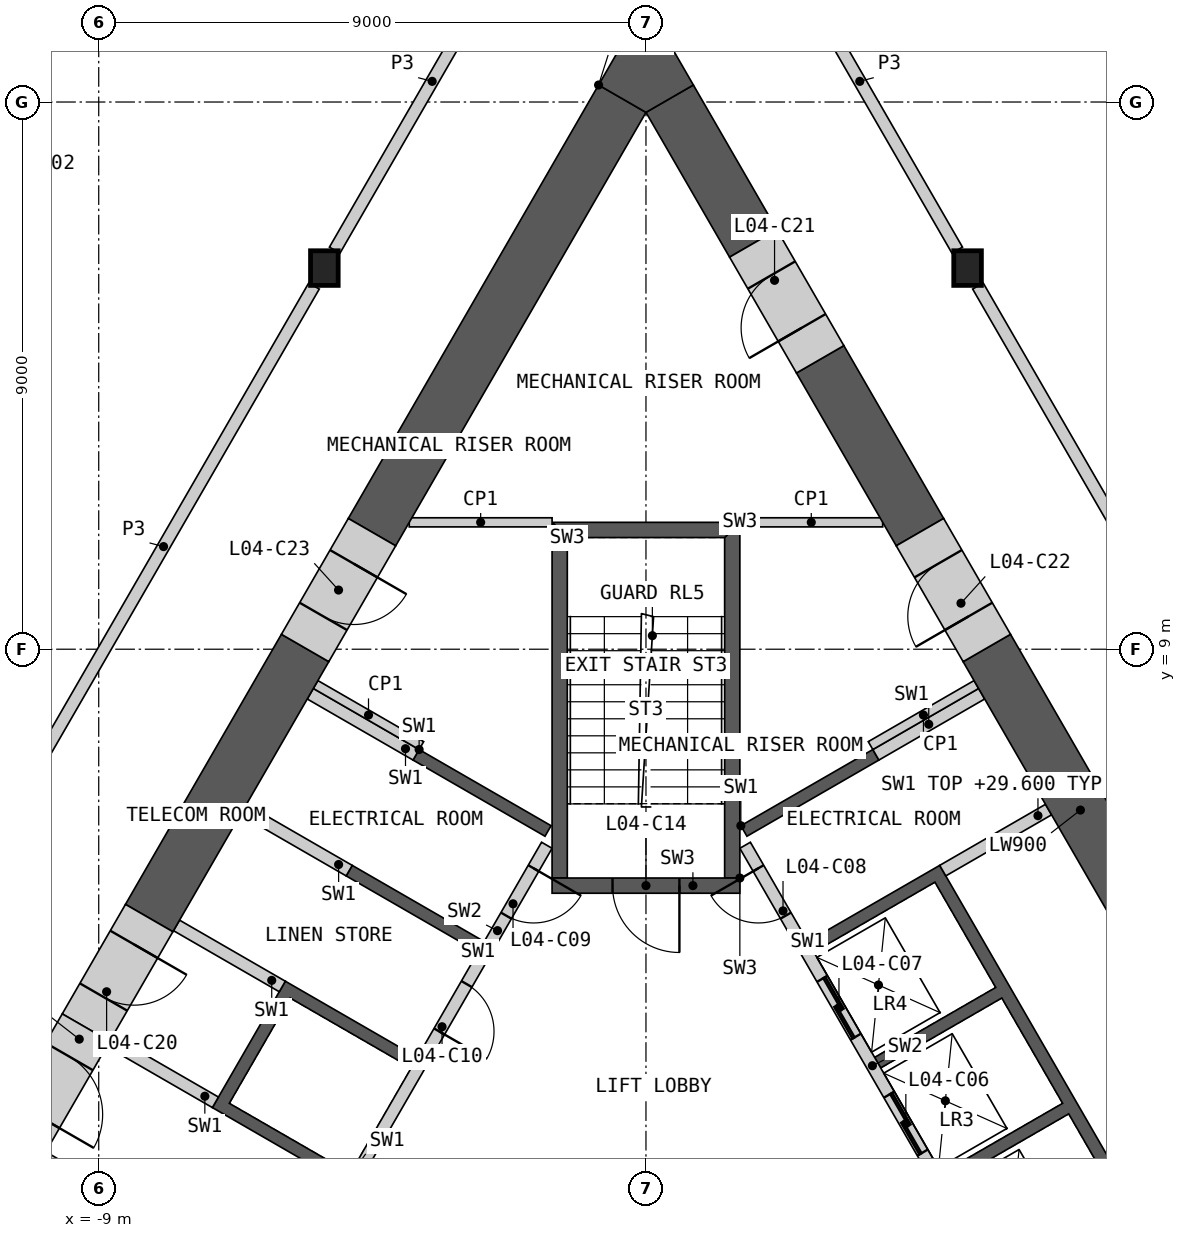
"""IFC4 building model, lengths in metres.
Left out: names, types, materials, properties, quantities, classifications, styles, units other than length and angle.
Written with IfcOpenShell. Run it as: python <this file> out.ifc"""

import sys

from ifc_helpers import new_model, si_unit, direction, frame, frame_2d, origin, origin_2d, place, context, subcontext, project, spatial, polyline, rectangle, i_section, outline, extrude, element, fill, save


model = new_model("IFC4")
c1 = context("Model", 3, precision=1e-05, world=origin(), true_north=direction((0.0, 1.0)))
c2 = subcontext(c1, "Body", "Model", "MODEL_VIEW")
j1 = project(units=[si_unit("LENGTHUNIT", "METRE"), si_unit("PLANEANGLEUNIT", "RADIAN")], contexts=[c1])
p1 = place(None, origin())
s1 = spatial("IfcSite", under=j1, at=p1, CompositionType="ELEMENT")
p2 = place(p1, origin())
s2 = spatial("IfcBuilding", under=s1, at=p2, CompositionType="ELEMENT")
p3 = place(p2, frame((0.0, 0.0, 25.5)))
s3 = spatial("IfcBuildingStorey", under=s2, at=p3, CompositionType="ELEMENT", Elevation=25.5)
for number, where, z_axis, x_axis in (
    (1, (-5.289, 15.269, 0.0), (0.0, 0.0, 1.0), (1.0, 0.0, 0.0)),
    (2, (5.289, 15.269, 0.0), (0.0, 0.0, 1.0), (1.0, 0.0, 0.0)),
):
    element("IfcColumn", number, at=place(p3, frame(where, z_axis=z_axis, x_axis=x_axis)), inside=s3, PredefinedType="COLUMN", context=c2, shape_type="SweptSolid", body=[
        extrude(i_section(OverallWidth=0.454, OverallDepth=0.57, WebThickness=0.078, FlangeThickness=0.125, at=origin_2d()), origin(), (0.0, 0.0, 1.0), 4.5),
    ])
p4 = place(p3, origin())
e3 = element("IfcWall", 3, at=p4, inside=s3, PredefinedType="SHEAR", context=c2, shape_type="SweptSolid", body=[
    extrude(outline(polyline([(1.561, 6.097), (3.731, 7.35), (3.831, 7.177), (1.66, 5.924), (1.561, 6.097)])), origin(), (0.0, 0.0, 1.0), 4.1),
])
p5 = place(p3, origin())
e4 = element("IfcWall", 4, at=p5, inside=s3, PredefinedType="SHEAR", context=c2, shape_type="SweptSolid", body=[
    extrude(outline(polyline([(2.66, 4.192), (4.831, 5.445), (8.231, -0.444), (6.061, -1.697), (5.96, -1.524), (7.952, -0.374), (6.952, 1.358), (4.96, 0.208), (4.861, 0.381), (6.852, 1.531), (5.852, 3.263), (3.861, 2.113), (3.76, 2.287), (5.752, 3.437), (4.752, 5.169), (2.76, 4.019), (2.66, 4.192)])), origin(), (0.0, 0.0, 1.0), 4.1),
])
p6 = place(p3, frame((5.817, -1.476, 0.0), z_axis=(0.0, 0.0, 1.0), x_axis=(-0.500002616675, 0.866023893041, 0.0)))
e5 = element("IfcWall", 5, at=p6, inside=s3, PredefinedType="SOLIDWALL", context=c2, shape_type="SweptSolid", body=[
    extrude(rectangle(XDim=8.373, YDim=0.2, at=frame_2d((4.187, 0.0))), origin(), (0.0, 0.0, 1.0), 4.1),
])
p7 = place(p6, frame((0.337, 0.0, 0.0)))
e6 = element("IfcOpeningElement", 6, at=p7, cuts=e5, PredefinedType="OPENING", context=c2, shape_type="SweptSolid", body=[
    extrude(rectangle(XDim=1.1, YDim=2.1, at=frame_2d((0.55, 1.05))), frame((0.0, 0.11, 0.0), z_axis=(0.0, -1.0, 0.0), x_axis=(1.0, 0.0, 0.0)), (0.0, 0.0, 1.0), 0.22),
])
p8 = place(p6, frame((2.537, 0.0, 0.0)))
e7 = element("IfcOpeningElement", 7, at=p8, cuts=e5, PredefinedType="OPENING", context=c2, shape_type="SweptSolid", body=[
    extrude(rectangle(XDim=1.1, YDim=2.1, at=frame_2d((0.55, 1.05))), frame((0.0, 0.11, 0.0), z_axis=(0.0, -1.0, 0.0), x_axis=(1.0, 0.0, 0.0)), (0.0, 0.0, 1.0), 0.22),
])
p9 = place(p6, frame((4.737, 0.0, 0.0)))
e8 = element("IfcOpeningElement", 8, at=p9, cuts=e5, PredefinedType="OPENING", context=c2, shape_type="SweptSolid", body=[
    extrude(rectangle(XDim=1.1, YDim=2.1, at=frame_2d((0.55, 1.05))), frame((0.0, 0.11, 0.0), z_axis=(0.0, -1.0, 0.0), x_axis=(1.0, 0.0, 0.0)), (0.0, 0.0, 1.0), 0.22),
])
p10 = place(p6, frame((7.037, 0.0, 0.0)))
e9 = element("IfcOpeningElement", 9, at=p10, cuts=e5, PredefinedType="OPENING", context=c2, shape_type="SweptSolid", body=[
    extrude(rectangle(XDim=0.9, YDim=2.1, at=frame_2d((0.45, 1.05))), frame((0.0, 0.11, 0.0), z_axis=(0.0, -1.0, 0.0), x_axis=(1.0, 0.0, 0.0)), (0.0, 0.0, 1.0), 0.22),
])
p11 = place(p3, frame((4.881, 5.358, 0.0), z_axis=(0.0, 0.0, 1.0), x_axis=(0.866035824272, 0.499981950752, 0.0)))
e10 = element("IfcWall", 10, at=p11, inside=s3, PredefinedType="SHEAR", context=c2, shape_type="SweptSolid", body=[
    extrude(rectangle(XDim=2.009, YDim=0.2, at=frame_2d((1.004, 0.0))), origin(), (0.0, 0.0, 1.0), 4.1),
])
p12 = place(p3, frame((3.781, 7.263, 0.0), z_axis=(0.0, 0.0, 1.0), x_axis=(0.865983199114, 0.50007309351, 0.0)))
e11 = element("IfcWall", 11, at=p12, inside=s3, PredefinedType="SHEAR", context=c2, shape_type="SweptSolid", body=[
    extrude(rectangle(XDim=2.009, YDim=0.2, at=frame_2d((1.004, 0.0))), origin(), (0.0, 0.0, 1.0), 4.1),
])
p13 = place(p3, origin())
e12 = element("IfcWall", 12, at=p13, inside=s3, PredefinedType="SHEAR", context=c2, shape_type="SweptSolid", body=[
    extrude(outline(polyline([(-4.96, 0.208), (-7.131, 1.461), (-5.931, 3.54), (-3.76, 2.287), (-3.861, 2.113), (-5.852, 3.263), (-6.852, 1.531), (-4.861, 0.381), (-4.96, 0.208)])), origin(), (0.0, 0.0, 1.0), 4.1),
])
p14 = place(p3, origin())
e13 = element("IfcWall", 13, at=p14, inside=s3, PredefinedType="SHEAR", context=c2, shape_type="SweptSolid", body=[
    extrude(outline(polyline([(-2.76, 4.019), (-4.931, 5.272), (-4.831, 5.445), (-2.66, 4.192), (-2.76, 4.019)])), origin(), (0.0, 0.0, 1.0), 4.1),
])
p15 = place(p3, origin())
e14 = element("IfcWall", 14, at=p15, inside=s3, PredefinedType="SHEAR", context=c2, shape_type="SweptSolid", body=[
    extrude(outline(polyline([(-3.731, 7.35), (-1.561, 6.097), (-1.66, 5.924), (-3.831, 7.177), (-3.731, 7.35)])), origin(), (0.0, 0.0, 1.0), 4.1),
])
p16 = place(p3, frame((-1.631, 5.776, 0.0), z_axis=(0.0, 0.0, 1.0), x_axis=(-0.499992876559, -0.866029516466, 0.0)))
e15 = element("IfcWall", 15, at=p16, inside=s3, PredefinedType="SOLIDWALL", context=c2, shape_type="SweptSolid", body=[
    extrude(rectangle(XDim=6.486, YDim=0.2, at=frame_2d((3.243, 0.0))), origin(), (0.0, 0.0, 1.0), 4.1),
])
p17 = place(p16, frame((0.437, 0.0, 0.0)))
e16 = element("IfcOpeningElement", 16, at=p17, cuts=e15, PredefinedType="OPENING", context=c2, shape_type="SweptSolid", body=[
    extrude(rectangle(XDim=0.9, YDim=2.1, at=frame_2d((0.45, 1.05))), frame((0.0, 0.11, 0.0), z_axis=(0.0, -1.0, 0.0), x_axis=(1.0, 0.0, 0.0)), (0.0, 0.0, 1.0), 0.22),
])
p18 = place(p16, frame((2.637, 0.0, 0.0)))
e17 = element("IfcOpeningElement", 17, at=p18, cuts=e15, PredefinedType="OPENING", context=c2, shape_type="SweptSolid", body=[
    extrude(rectangle(XDim=0.9, YDim=2.1, at=frame_2d((0.45, 1.05))), frame((0.0, 0.11, 0.0), z_axis=(0.0, -1.0, 0.0), x_axis=(1.0, 0.0, 0.0)), (0.0, 0.0, 1.0), 0.22),
])
p19 = place(p3, frame((-3.781, 7.263, 0.0), z_axis=(0.0, 0.0, 1.0), x_axis=(-0.865983199114, 0.50007309351, 0.0)))
e18 = element("IfcWall", 18, at=p19, inside=s3, PredefinedType="SHEAR", context=c2, shape_type="SweptSolid", body=[
    extrude(rectangle(XDim=2.009, YDim=0.2, at=frame_2d((1.004, 0.0))), origin(), (0.0, 0.0, 1.0), 4.1),
])
p20 = place(p3, frame((-4.881, 5.358, 0.0), z_axis=(0.0, 0.0, 1.0), x_axis=(-0.866035824272, 0.499981950752, 0.0)))
e19 = element("IfcWall", 19, at=p20, inside=s3, PredefinedType="SHEAR", context=c2, shape_type="SweptSolid", body=[
    extrude(rectangle(XDim=2.009, YDim=0.2, at=frame_2d((1.004, 0.0))), origin(), (0.0, 0.0, 1.0), 4.1),
])
p21 = place(p3, frame((-5.981, 3.453, 0.0), z_axis=(0.0, 0.0, 1.0), x_axis=(-0.866013584312, 0.500020471368, 0.0)))
e20 = element("IfcWall", 20, at=p21, inside=s3, PredefinedType="SHEAR", context=c2, shape_type="SweptSolid", body=[
    extrude(rectangle(XDim=2.009, YDim=0.2, at=frame_2d((1.005, 0.0))), origin(), (0.0, 0.0, 1.0), 4.1),
])
p22 = place(p3, frame((-7.081, 1.548, 0.0), z_axis=(0.0, 0.0, 1.0), x_axis=(-0.865983199114, 0.50007309351, 0.0)))
e21 = element("IfcWall", 21, at=p22, inside=s3, PredefinedType="SHEAR", context=c2, shape_type="SweptSolid", body=[
    extrude(rectangle(XDim=2.009, YDim=0.2, at=frame_2d((1.004, 0.0))), origin(), (0.0, 0.0, 1.0), 4.1),
])
p23 = place(p3, frame((-8.181, -0.357, 0.0), z_axis=(0.0, 0.0, 1.0), x_axis=(-0.866035824272, 0.499981950752, 0.0)))
e22 = element("IfcWall", 22, at=p23, inside=s3, PredefinedType="SHEAR", context=c2, shape_type="SweptSolid", body=[
    extrude(rectangle(XDim=2.009, YDim=0.2, at=frame_2d((1.004, 0.0))), origin(), (0.0, 0.0, 1.0), 4.1),
])
p24 = place(p3, origin())
e23 = element("IfcWall", 23, at=p24, inside=s3, PredefinedType="SHEAR", context=c2, shape_type="SweptSolid", body=[
    extrude(outline(polyline([(1.544, 5.237), (1.544, 11.087), (1.294, 10.837), (1.294, 5.237), (1.544, 5.237)])), origin(), (0.0, 0.0, 1.0), 4.1),
])
p25 = place(p3, origin())
e24 = element("IfcWall", 24, at=p25, inside=s3, PredefinedType="SHEAR", context=c2, shape_type="SweptSolid", body=[
    extrude(outline(polyline([(1.544, 11.087), (-1.544, 11.087), (-1.294, 10.837), (1.294, 10.837), (1.544, 11.087)])), origin(), (0.0, 0.0, 1.0), 4.1),
])
p26 = place(p3, origin())
e25 = element("IfcWall", 25, at=p26, inside=s3, PredefinedType="SHEAR", context=c2, shape_type="SweptSolid", body=[
    extrude(outline(polyline([(-1.294, 10.837), (-1.544, 11.087), (-1.544, 5.237), (-1.294, 5.237), (-1.294, 10.837)])), origin(), (0.0, 0.0, 1.0), 4.1),
])
p27 = place(p3, frame((1.544, 5.112, 0.0), z_axis=(0.0, 0.0, 1.0), x_axis=(-1.0, 0.0, 0.0)))
e26 = element("IfcWall", 26, at=p27, inside=s3, PredefinedType="SHEAR", context=c2, shape_type="SweptSolid", body=[
    extrude(rectangle(XDim=3.088, YDim=0.25, at=frame_2d((1.544, 0.0))), origin(), (0.0, 0.0, 1.0), 4.1),
])
p28 = place(p27, frame((0.994, 0.0, 0.0)))
e27 = element("IfcOpeningElement", 27, at=p28, cuts=e26, PredefinedType="OPENING", context=c2, shape_type="SweptSolid", body=[
    extrude(rectangle(XDim=1.1, YDim=2.1, at=frame_2d((0.55, 1.05))), frame((0.0, 0.135, 0.0), z_axis=(0.0, -1.0, 0.0), x_axis=(1.0, 0.0, 0.0)), (0.0, 0.0, 1.0), 0.27),
])
for number, where, z_axis, x_axis in (
    (28, (3.693, 7.415, 0.0), (0.0, 0.0, 1.0), (0.866, 0.5, 0.0)),
    (29, (-3.693, 7.415, 0.0), (0.0, 0.0, 1.0), (-0.866, 0.5, 0.0)),
):
    element("IfcWall", number, at=place(p3, frame(where, z_axis=z_axis, x_axis=x_axis)), inside=s3, PredefinedType="PARTITIONING", context=c2, shape_type="SweptSolid", body=[
        extrude(rectangle(XDim=2.009, YDim=0.15, at=frame_2d((1.004, 0.0))), origin(), (0.0, 0.0, 1.0), 4.1),
    ])
for number, where, z_axis, x_axis in (
    (30, (1.544, 11.087, 0.0), (0.0, 0.0, 1.0), (1.0, 0.0, 0.0)),
    (31, (-1.544, 11.087, 0.0), (0.0, 0.0, 1.0), (-1.0, 0.0, 0.0)),
):
    element("IfcWall", number, at=place(p3, frame(where, z_axis=z_axis, x_axis=x_axis)), inside=s3, PredefinedType="PARTITIONING", context=c2, shape_type="SweptSolid", body=[
        extrude(rectangle(XDim=2.349, YDim=0.15, at=frame_2d((1.175, 0.0))), origin(), (0.0, 0.0, 1.0), 4.1),
    ])
p29 = place(p3, frame((8.684, 3.688, 0.0), z_axis=(0.0, 0.0, 1.0), x_axis=(-0.499990189338, 0.866031067899, 0.0)))
e32 = element("IfcWall", 32, at=p29, inside=s3, PredefinedType="SHEAR", context=c2, shape_type="SweptSolid", body=[
    extrude(rectangle(XDim=6.157, YDim=0.9, at=frame_2d((3.078, 0.0))), origin(), (0.0, 0.0, 1.0), 4.1),
])
p30 = place(p3, frame((4.506, 10.926, 0.0), z_axis=(0.0, 0.0, 1.0), x_axis=(-0.499995024727, 0.866028276241, 0.0)))
e33 = element("IfcWall", 33, at=p30, inside=s3, PredefinedType="SHEAR", context=c2, shape_type="SweptSolid", body=[
    extrude(rectangle(XDim=3.282, YDim=0.9, at=frame_2d((1.641, 0.0))), origin(), (0.0, 0.0, 1.0), 4.1),
])
p31 = place(p3, frame((1.765, 15.674, 0.0), z_axis=(0.0, 0.0, 1.0), x_axis=(-0.500034990121, 0.866005201286, 0.0)))
e34 = element("IfcWall", 34, at=p31, inside=s3, PredefinedType="SHEAR", context=c2, shape_type="SweptSolid", body=[
    extrude(rectangle(XDim=2.75, YDim=0.9, at=frame_2d((1.375, 0.0))), origin(), (0.0, 0.0, 1.0), 4.1),
])
p32 = place(p3, frame((-0.39, 18.055, 0.0), z_axis=(0.0, 0.0, 1.0), x_axis=(-0.499995435471, -0.8660280391, 0.0)))
e35 = element("IfcWall", 35, at=p32, inside=s3, PredefinedType="SHEAR", context=c2, shape_type="SweptSolid", body=[
    extrude(rectangle(XDim=8.232, YDim=0.9, at=frame_2d((4.116, 0.0))), origin(), (0.0, 0.0, 1.0), 4.1),
])
p33 = place(p3, frame((-5.606, 9.021, 0.0), z_axis=(0.0, 0.0, 1.0), x_axis=(-0.500024603663, -0.866011198387, 0.0)))
e36 = element("IfcWall", 36, at=p33, inside=s3, PredefinedType="SHEAR", context=c2, shape_type="SweptSolid", body=[
    extrude(rectangle(XDim=5.129, YDim=0.9, at=frame_2d((2.564, 0.0))), origin(), (0.0, 0.0, 1.0), 4.1),
])
p34 = place(p3, origin())
e37 = element("IfcWall", 37, at=p34, inside=s3, PredefinedType="SHEAR", context=c2, shape_type="SweptSolid", body=[
    extrude(outline(polyline([(-0.779, 18.28), (0.0, 19.63), (0.779, 18.28), (0.0, 17.83), (-0.779, 18.28)])), origin(), (0.0, 0.0, 1.0), 4.1),
])
p35 = place(p3, frame((-8.17, 4.579, 0.0), z_axis=(0.0, 0.0, 1.0), x_axis=(-0.499888406853, -0.866089822532, 0.0)))
e38 = element("IfcWall", 38, at=p35, inside=s3, PredefinedType="SHEAR", context=c2, shape_type="SweptSolid", body=[
    extrude(rectangle(XDim=2.08, YDim=0.9, at=frame_2d((1.04, 0.0))), origin(), (0.0, 0.0, 1.0), 4.1),
])
p36 = place(p35, frame((0.5, 0.0, 0.0)))
e39 = element("IfcOpeningElement", 39, at=p36, cuts=e38, PredefinedType="OPENING", context=c2, shape_type="SweptSolid", body=[
    extrude(rectangle(XDim=1.0, YDim=2.1, at=frame_2d((0.5, 1.05))), frame((0.0, 0.46, 0.0), z_axis=(0.0, -1.0, 0.0), x_axis=(1.0, 0.0, 0.0)), (0.0, 0.0, 1.0), 0.92),
])
p37 = place(p3, frame((2.865, 13.768, 0.0), z_axis=(0.0, 0.0, 1.0), x_axis=(-0.50002983664, 0.866008176907, 0.0)))
e40 = element("IfcWall", 40, at=p37, inside=s3, PredefinedType="SHEAR", context=c2, shape_type="SweptSolid", body=[
    extrude(rectangle(XDim=2.2, YDim=0.9, at=frame_2d((1.1, 0.0))), origin(), (0.0, 0.0, 1.0), 4.1),
])
p38 = place(p37, frame((0.6, 0.0, 0.0)))
e41 = element("IfcOpeningElement", 41, at=p38, cuts=e40, PredefinedType="OPENING", context=c2, shape_type="SweptSolid", body=[
    extrude(rectangle(XDim=1.0, YDim=2.1, at=frame_2d((0.5, 1.05))), frame((0.0, 0.46, 0.0), z_axis=(0.0, -1.0, 0.0), x_axis=(1.0, 0.0, 0.0)), (0.0, 0.0, 1.0), 0.92),
])
p39 = place(p3, frame((5.606, 9.021, 0.0), z_axis=(0.0, 0.0, 1.0), x_axis=(-0.499946605688, 0.86605622881, 0.0)))
e42 = element("IfcWall", 42, at=p39, inside=s3, PredefinedType="SHEAR", context=c2, shape_type="SweptSolid", body=[
    extrude(rectangle(XDim=2.2, YDim=0.9, at=frame_2d((1.1, 0.0))), origin(), (0.0, 0.0, 1.0), 4.1),
])
p40 = place(p39, frame((0.6, 0.0, 0.0)))
e43 = element("IfcOpeningElement", 43, at=p40, cuts=e42, PredefinedType="OPENING", context=c2, shape_type="SweptSolid", body=[
    extrude(rectangle(XDim=1.0, YDim=2.1, at=frame_2d((0.5, 1.05))), frame((0.0, 0.46, 0.0), z_axis=(0.0, -1.0, 0.0), x_axis=(1.0, 0.0, 0.0)), (0.0, 0.0, 1.0), 0.92),
])
p41 = place(p3, frame((-4.506, 10.926, 0.0), z_axis=(0.0, 0.0, 1.0), x_axis=(-0.499946605688, -0.86605622881, 0.0)))
e44 = element("IfcWall", 44, at=p41, inside=s3, PredefinedType="SHEAR", context=c2, shape_type="SweptSolid", body=[
    extrude(rectangle(XDim=2.2, YDim=0.9, at=frame_2d((1.1, 0.0))), origin(), (0.0, 0.0, 1.0), 4.1),
])
p42 = place(p41, frame((0.6, 0.0, 0.0)))
e45 = element("IfcOpeningElement", 45, at=p42, cuts=e44, PredefinedType="OPENING", context=c2, shape_type="SweptSolid", body=[
    extrude(rectangle(XDim=1.0, YDim=2.1, at=frame_2d((0.5, 1.05))), frame((0.0, 0.46, 0.0), z_axis=(0.0, -1.0, 0.0), x_axis=(1.0, 0.0, 0.0)), (0.0, 0.0, 1.0), 0.92),
])
p43 = place(p3, frame((-9.21, 2.777, 0.0), z_axis=(0.0, 0.0, 1.0), x_axis=(-0.500077893725, -0.86598042715, 0.0)))
e46 = element("IfcWall", 46, at=p43, inside=s3, PredefinedType="SHEAR", context=c2, shape_type="SweptSolid", body=[
    extrude(rectangle(XDim=2.2, YDim=0.9, at=frame_2d((1.1, 0.0))), origin(), (0.0, 0.0, 1.0), 4.1),
])
p44 = place(p43, frame((0.55, 0.0, 0.0)))
e47 = element("IfcOpeningElement", 47, at=p44, cuts=e46, PredefinedType="OPENING", context=c2, shape_type="SweptSolid", body=[
    extrude(rectangle(XDim=1.1, YDim=2.1, at=frame_2d((0.55, 1.05))), frame((0.0, 0.46, 0.0), z_axis=(0.0, -1.0, 0.0), x_axis=(1.0, 0.0, 0.0)), (0.0, 0.0, 1.0), 0.92),
])
for number, where, z_axis, x_axis in (
    (48, (5.459, 14.974, 0.0), (0.0, 0.0, 1.0), (0.5, -0.866, 0.0)),
    (49, (-10.408, 6.402, 0.0), (0.0, 0.0, 1.0), (0.5, 0.866, 0.0)),
):
    element("IfcWall", number, at=place(p3, frame(where, z_axis=z_axis, x_axis=x_axis)), inside=s3, PredefinedType="PARTITIONING", context=c2, shape_type="SweptSolid", body=[
        extrude(rectangle(XDim=9.898, YDim=0.2, at=frame_2d((4.949, 0.0))), origin(), (0.0, 0.0, 1.0), 4.1),
    ])
for number, where, z_axis, x_axis in (
    (50, (-5.119, 15.563, 0.0), (0.0, 0.0, 1.0), (0.5, 0.866, 0.0)),
    (51, (1.913, 21.116, 0.0), (0.0, 0.0, 1.0), (0.5, -0.866, 0.0)),
):
    element("IfcWall", number, at=place(p3, frame(where, z_axis=z_axis, x_axis=x_axis)), inside=s3, PredefinedType="PARTITIONING", context=c2, shape_type="SweptSolid", body=[
        extrude(rectangle(XDim=6.412, YDim=0.2, at=frame_2d((3.206, 0.0))), origin(), (0.0, 0.0, 1.0), 4.1),
    ])
p45 = place(p8, origin())
e52 = element("IfcDoor", 52, at=p45, inside=s3, OperationType="SLIDING_TO_LEFT", PredefinedType="DOOR", context=c2, shape_type="SweptSolid", body=[
    extrude(rectangle(XDim=1.1, YDim=2.1, at=frame_2d((0.55, 1.05))), frame((0.0, 0.025, 0.0), z_axis=(0.0, -1.0, 0.0), x_axis=(1.0, 0.0, 0.0)), (0.0, 0.0, 1.0), 0.05),
])
fill(e7, e52)
p46 = place(p9, origin())
e53 = element("IfcDoor", 53, at=p46, inside=s3, OperationType="SLIDING_TO_LEFT", PredefinedType="DOOR", context=c2, shape_type="SweptSolid", body=[
    extrude(rectangle(XDim=1.1, YDim=2.1, at=frame_2d((0.55, 1.05))), frame((0.0, 0.025, 0.0), z_axis=(0.0, -1.0, 0.0), x_axis=(1.0, 0.0, 0.0)), (0.0, 0.0, 1.0), 0.05),
])
fill(e8, e53)
p47 = place(p10, origin())
e54 = element("IfcDoor", 54, at=p47, inside=s3, OperationType="SINGLE_SWING_RIGHT", PredefinedType="DOOR", context=c2, shape_type="SweptSolid", body=[
    extrude(rectangle(XDim=0.9, YDim=2.1, at=frame_2d((0.45, 1.05))), frame((0.0, 0.025, 0.0), z_axis=(0.0, -1.0, 0.0), x_axis=(1.0, 0.0, 0.0)), (0.0, 0.0, 1.0), 0.05),
])
fill(e9, e54)
p48 = place(p17, origin())
e55 = element("IfcDoor", 55, at=p48, inside=s3, OperationType="SINGLE_SWING_LEFT", PredefinedType="DOOR", context=c2, shape_type="SweptSolid", body=[
    extrude(rectangle(XDim=0.9, YDim=2.1, at=frame_2d((0.45, 1.05))), frame((0.0, 0.025, 0.0), z_axis=(0.0, -1.0, 0.0), x_axis=(1.0, 0.0, 0.0)), (0.0, 0.0, 1.0), 0.05),
])
fill(e16, e55)
p49 = place(p18, origin())
e56 = element("IfcDoor", 56, at=p49, inside=s3, OperationType="SINGLE_SWING_RIGHT", PredefinedType="DOOR", context=c2, shape_type="SweptSolid", body=[
    extrude(rectangle(XDim=0.9, YDim=2.1, at=frame_2d((0.45, 1.05))), frame((0.0, 0.025, 0.0), z_axis=(0.0, -1.0, 0.0), x_axis=(1.0, 0.0, 0.0)), (0.0, 0.0, 1.0), 0.05),
])
fill(e17, e56)
p50 = place(p28, origin())
e57 = element("IfcDoor", 57, at=p50, inside=s3, OperationType="SINGLE_SWING_LEFT", PredefinedType="DOOR", context=c2, shape_type="SweptSolid", body=[
    extrude(rectangle(XDim=1.1, YDim=2.1, at=frame_2d((0.55, 1.05))), frame((0.0, 0.025, 0.0), z_axis=(0.0, -1.0, 0.0), x_axis=(1.0, 0.0, 0.0)), (0.0, 0.0, 1.0), 0.05),
])
fill(e27, e57)
p51 = place(p36, origin())
e58 = element("IfcDoor", 58, at=p51, inside=s3, OperationType="SINGLE_SWING_LEFT", PredefinedType="DOOR", context=c2, shape_type="SweptSolid", body=[
    extrude(rectangle(XDim=1.0, YDim=2.1, at=frame_2d((0.5, 1.05))), frame((0.0, 0.205, 0.0), z_axis=(0.0, -1.0, 0.0), x_axis=(1.0, 0.0, 0.0)), (0.0, 0.0, 1.0), 0.05),
])
fill(e39, e58)
p52 = place(p38, origin())
e59 = element("IfcDoor", 59, at=p52, inside=s3, OperationType="SINGLE_SWING_LEFT", PredefinedType="DOOR", context=c2, shape_type="SweptSolid", body=[
    extrude(rectangle(XDim=1.0, YDim=2.1, at=frame_2d((0.5, 1.05))), frame((0.0, 0.205, 0.0), z_axis=(0.0, -1.0, 0.0), x_axis=(1.0, 0.0, 0.0)), (0.0, 0.0, 1.0), 0.05),
])
fill(e41, e59)
p53 = place(p40, origin())
e60 = element("IfcDoor", 60, at=p53, inside=s3, OperationType="SINGLE_SWING_LEFT", PredefinedType="DOOR", context=c2, shape_type="SweptSolid", body=[
    extrude(rectangle(XDim=1.0, YDim=2.1, at=frame_2d((0.5, 1.05))), frame((0.0, 0.205, 0.0), z_axis=(0.0, -1.0, 0.0), x_axis=(1.0, 0.0, 0.0)), (0.0, 0.0, 1.0), 0.05),
])
fill(e43, e60)
p54 = place(p42, origin())
e61 = element("IfcDoor", 61, at=p54, inside=s3, OperationType="SINGLE_SWING_LEFT", PredefinedType="DOOR", context=c2, shape_type="SweptSolid", body=[
    extrude(rectangle(XDim=1.0, YDim=2.1, at=frame_2d((0.5, 1.05))), frame((0.0, 0.205, 0.0), z_axis=(0.0, -1.0, 0.0), x_axis=(1.0, 0.0, 0.0)), (0.0, 0.0, 1.0), 0.05),
])
fill(e45, e61)
p55 = place(p44, origin())
e62 = element("IfcDoor", 62, at=p55, inside=s3, OperationType="SINGLE_SWING_RIGHT", PredefinedType="DOOR", context=c2, shape_type="SweptSolid", body=[
    extrude(rectangle(XDim=1.1, YDim=2.1, at=frame_2d((0.55, 1.05))), frame((0.0, 0.205, 0.0), z_axis=(0.0, -1.0, 0.0), x_axis=(1.0, 0.0, 0.0)), (0.0, 0.0, 1.0), 0.05),
])
fill(e47, e62)
save(model, sys.argv[1])
